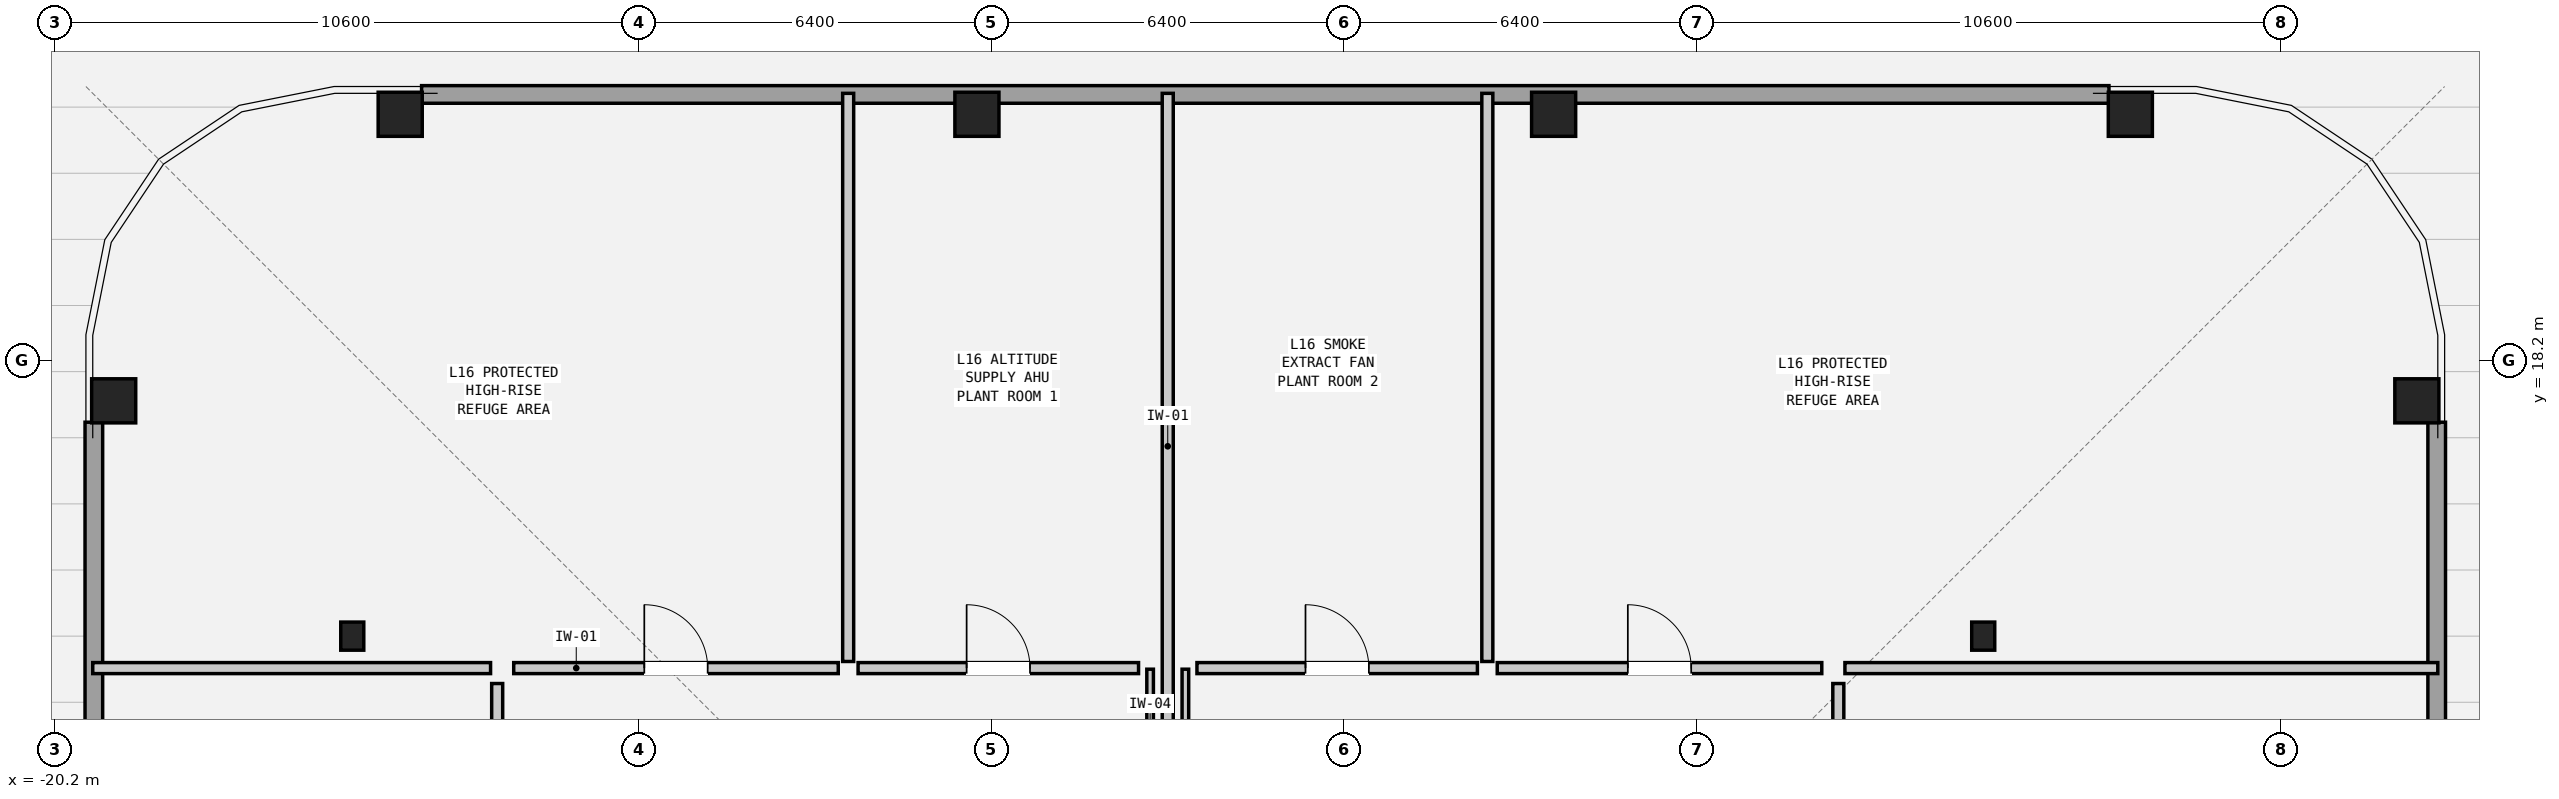
"""IFC4 building model, lengths in metres.
Left out: names, types, materials, properties, quantities, classifications, styles, units other than length and angle.
Written with IfcOpenShell. Run it as: python <this file> out.ifc"""

import sys

from ifc_helpers import new_model, si_unit, direction, frame, frame_2d, origin, origin_2d, place, context, subcontext, project, spatial, rectangle, hollow_rectangle, i_section, extrude, element, fill, save


model = new_model("IFC4")
c1 = context("Model", 3, precision=1e-05, world=origin(), true_north=direction((0.0, 1.0)))
c2 = subcontext(c1, "Body", "Model", "MODEL_VIEW")
j1 = project(units=[si_unit("LENGTHUNIT", "METRE"), si_unit("PLANEANGLEUNIT", "RADIAN")], contexts=[c1])
p1 = place(None, origin())
s1 = spatial("IfcSite", under=j1, at=p1, CompositionType="ELEMENT")
p2 = place(p1, origin())
s2 = spatial("IfcBuilding", under=s1, at=p2, CompositionType="ELEMENT")
p3 = place(p2, frame((0.0, 0.0, 57.9)))
s3 = spatial("IfcBuildingStorey", under=s2, at=p3, CompositionType="ELEMENT", Elevation=57.9)
for number, where, z_axis, x_axis in (
    (1, (22.67, 17.47, 0.0), (0.0, 0.0, 1.0), (0.0, 1.0, 0.0)),
    (2, (17.47, 22.67, 0.0), (0.0, 0.0, 1.0), (1.0, 0.0, 0.0)),
    (3, (7.003, 22.67, 0.0), (0.0, 0.0, 1.0), (1.0, 0.0, 0.0)),
    (4, (-3.463, 22.67, 0.0), (0.0, 0.0, 1.0), (1.0, 0.0, 0.0)),
    (5, (-13.93, 22.67, 0.0), (0.0, 0.0, 1.0), (1.0, 0.0, 0.0)),
    (6, (-19.13, 17.47, 0.0), (0.0, 0.0, 1.0), (0.0, 1.0, 0.0)),
):
    element("IfcColumn", number, at=place(p3, frame(where, z_axis=z_axis, x_axis=x_axis)), inside=s3, PredefinedType="COLUMN", context=c2, shape_type="SweptSolid", body=[
        extrude(hollow_rectangle(XDim=0.8, YDim=0.8, WallThickness=0.05, at=origin_2d()), origin(), (0.0, 0.0, 1.0), 3.6),
    ])
for number, where, z_axis, x_axis in (
    (7, (-14.8, 13.2, 0.0), (0.0, 0.0, 1.0), (1.0, 0.0, 0.0)),
    (8, (14.8, 13.2, 0.0), (0.0, 0.0, 1.0), (1.0, 0.0, 0.0)),
):
    element("IfcColumn", number, at=place(p3, frame(where, z_axis=z_axis, x_axis=x_axis)), inside=s3, PredefinedType="COLUMN", context=c2, shape_type="SweptSolid", body=[
        extrude(i_section(OverallWidth=0.418, OverallDepth=0.51, WebThickness=0.042, FlangeThickness=0.068, at=origin_2d()), origin(), (0.0, 0.0, 1.0), 3.6),
    ])
for number, where, z_axis, x_axis in (
    (9, (23.03, 17.082, 0.0), (0.0, 0.0, 1.0), (0.0, -1.0, 0.0)),
    (10, (-13.542, 23.03, 0.0), (0.0, 0.0, 1.0), (1.0, 0.0, 0.0)),
    (11, (-19.49, -13.542, 0.0), (0.0, 0.0, 1.0), (0.0, 1.0, 0.0)),
):
    element("IfcWall", number, at=place(p3, frame(where, z_axis=z_axis, x_axis=x_axis)), inside=s3, PredefinedType="SOLIDWALL", context=c2, shape_type="SweptSolid", body=[
        extrude(rectangle(XDim=30.624, YDim=0.32, at=frame_2d((15.312, 0.0))), origin(), (0.0, 0.0, 1.0), 2.242),
    ])
p4 = place(p3, frame((0.0, 10.24, 0.0), z_axis=(0.0, 0.0, 1.0), x_axis=(0.0, 1.0, 0.0)))
e12 = element("IfcWall", 12, at=p4, inside=s3, PredefinedType="PARTITIONING", context=c2, shape_type="SweptSolid", body=[
    extrude(rectangle(XDim=12.81, YDim=0.2, at=frame_2d((6.405, 0.0))), origin(), (0.0, 0.0, 1.0), 2.901),
])
for number, where, z_axis, x_axis in (
    (13, (-0.32, 10.24, 0.0), (0.0, 0.0, 1.0), (0.0, 1.0, 0.0)),
    (14, (0.32, 10.24, 0.0), (0.0, 0.0, 1.0), (0.0, 1.0, 0.0)),
):
    element("IfcWall", number, at=place(p3, frame(where, z_axis=z_axis, x_axis=x_axis)), inside=s3, PredefinedType="PARTITIONING", context=c2, shape_type="SweptSolid", body=[
        extrude(rectangle(XDim=2.36, YDim=0.12, at=frame_2d((1.18, 0.0))), origin(), (0.0, 0.0, 1.0), 2.901),
    ])
p5 = place(p3, frame((-11.87, 12.62, 0.0), z_axis=(0.0, 0.0, 1.0), x_axis=(1.0, 0.0, 0.0)))
e15 = element("IfcWall", 15, at=p5, inside=s3, PredefinedType="PARTITIONING", context=c2, shape_type="SweptSolid", body=[
    extrude(rectangle(XDim=5.89, YDim=0.2, at=frame_2d((2.945, 0.0))), origin(), (0.0, 0.0, 1.0), 3.38),
])
p6 = place(p5, frame((2.37, 0.0, 0.0)))
e16 = element("IfcOpeningElement", 16, at=p6, cuts=e15, PredefinedType="OPENING", context=c2, shape_type="SweptSolid", body=[
    extrude(rectangle(XDim=1.15, YDim=2.1, at=frame_2d((0.575, 1.05))), frame((0.0, 0.112, 0.0), z_axis=(0.0, -1.0, 0.0), x_axis=(1.0, 0.0, 0.0)), (0.0, 0.0, 1.0), 0.224),
])
p7 = place(p3, frame((-5.8, 12.74, 0.0), z_axis=(0.0, 0.0, 1.0), x_axis=(0.0, 1.0, 0.0)))
e17 = element("IfcWall", 17, at=p7, inside=s3, PredefinedType="PARTITIONING", context=c2, shape_type="SweptSolid", body=[
    extrude(rectangle(XDim=10.31, YDim=0.2, at=frame_2d((5.155, 0.0))), origin(), (0.0, 0.0, 1.0), 2.901),
])
p8 = place(p3, frame((-5.62, 12.62, 0.0), z_axis=(0.0, 0.0, 1.0), x_axis=(1.0, 0.0, 0.0)))
e18 = element("IfcWall", 18, at=p8, inside=s3, PredefinedType="PARTITIONING", context=c2, shape_type="SweptSolid", body=[
    extrude(rectangle(XDim=5.09, YDim=0.2, at=frame_2d((2.545, 0.0))), origin(), (0.0, 0.0, 1.0), 3.38),
])
p9 = place(p8, frame((1.97, 0.0, 0.0)))
e19 = element("IfcOpeningElement", 19, at=p9, cuts=e18, PredefinedType="OPENING", context=c2, shape_type="SweptSolid", body=[
    extrude(rectangle(XDim=1.15, YDim=2.1, at=frame_2d((0.575, 1.05))), frame((0.0, 0.112, 0.0), z_axis=(0.0, -1.0, 0.0), x_axis=(1.0, 0.0, 0.0)), (0.0, 0.0, 1.0), 0.224),
])
p10 = place(p3, frame((0.53, 12.62, 0.0), z_axis=(0.0, 0.0, 1.0), x_axis=(1.0, 0.0, 0.0)))
e20 = element("IfcWall", 20, at=p10, inside=s3, PredefinedType="PARTITIONING", context=c2, shape_type="SweptSolid", body=[
    extrude(rectangle(XDim=5.09, YDim=0.2, at=frame_2d((2.545, 0.0))), origin(), (0.0, 0.0, 1.0), 3.38),
])
p11 = place(p10, frame((1.97, 0.0, 0.0)))
e21 = element("IfcOpeningElement", 21, at=p11, cuts=e20, PredefinedType="OPENING", context=c2, shape_type="SweptSolid", body=[
    extrude(rectangle(XDim=1.15, YDim=2.1, at=frame_2d((0.575, 1.05))), frame((0.0, 0.112, 0.0), z_axis=(0.0, -1.0, 0.0), x_axis=(1.0, 0.0, 0.0)), (0.0, 0.0, 1.0), 0.224),
])
p12 = place(p3, frame((5.8, 12.74, 0.0), z_axis=(0.0, 0.0, 1.0), x_axis=(0.0, 1.0, 0.0)))
e22 = element("IfcWall", 22, at=p12, inside=s3, PredefinedType="PARTITIONING", context=c2, shape_type="SweptSolid", body=[
    extrude(rectangle(XDim=10.31, YDim=0.2, at=frame_2d((5.155, 0.0))), origin(), (0.0, 0.0, 1.0), 2.901),
])
p13 = place(p3, frame((5.98, 12.62, 0.0), z_axis=(0.0, 0.0, 1.0), x_axis=(1.0, 0.0, 0.0)))
e23 = element("IfcWall", 23, at=p13, inside=s3, PredefinedType="PARTITIONING", context=c2, shape_type="SweptSolid", body=[
    extrude(rectangle(XDim=5.89, YDim=0.2, at=frame_2d((2.945, 0.0))), origin(), (0.0, 0.0, 1.0), 3.38),
])
p14 = place(p13, frame((2.37, 0.0, 0.0)))
e24 = element("IfcOpeningElement", 24, at=p14, cuts=e23, PredefinedType="OPENING", context=c2, shape_type="SweptSolid", body=[
    extrude(rectangle(XDim=1.15, YDim=2.1, at=frame_2d((0.575, 1.05))), frame((0.0, 0.112, 0.0), z_axis=(0.0, -1.0, 0.0), x_axis=(1.0, 0.0, 0.0)), (0.0, 0.0, 1.0), 0.224),
])
p15 = place(p3, frame((-19.51, 12.62, 0.0), z_axis=(0.0, 0.0, 1.0), x_axis=(1.0, 0.0, 0.0)))
e25 = element("IfcWall", 25, at=p15, inside=s3, PredefinedType="PARTITIONING", context=c2, shape_type="SweptSolid", body=[
    extrude(rectangle(XDim=7.22, YDim=0.2, at=frame_2d((3.61, 0.0))), origin(), (0.0, 0.0, 1.0), 3.38),
])
p16 = place(p3, frame((12.29, 12.62, 0.0), z_axis=(0.0, 0.0, 1.0), x_axis=(1.0, 0.0, 0.0)))
e26 = element("IfcWall", 26, at=p16, inside=s3, PredefinedType="PARTITIONING", context=c2, shape_type="SweptSolid", body=[
    extrude(rectangle(XDim=10.76, YDim=0.2, at=frame_2d((5.38, 0.0))), origin(), (0.0, 0.0, 1.0), 3.38),
])
p17 = place(p3, frame((-12.17, 0.81, 0.0), z_axis=(0.0, 0.0, 1.0), x_axis=(0.0, 1.0, 0.0)))
e27 = element("IfcWall", 27, at=p17, inside=s3, PredefinedType="PARTITIONING", context=c2, shape_type="SweptSolid", body=[
    extrude(rectangle(XDim=11.53, YDim=0.2, at=frame_2d((5.765, 0.0))), origin(), (0.0, 0.0, 1.0), 3.38),
])
p18 = place(p17, frame((5.19, 0.0, 0.0)))
e28 = element("IfcOpeningElement", 28, at=p18, cuts=e27, PredefinedType="OPENING", context=c2, shape_type="SweptSolid", body=[
    extrude(rectangle(XDim=1.15, YDim=2.1, at=frame_2d((0.575, 1.05))), frame((0.0, 0.112, 0.0), z_axis=(0.0, -1.0, 0.0), x_axis=(1.0, 0.0, 0.0)), (0.0, 0.0, 1.0), 0.224),
])
p19 = place(p3, frame((12.17, 0.81, 0.0), z_axis=(0.0, 0.0, 1.0), x_axis=(0.0, 1.0, 0.0)))
e29 = element("IfcWall", 29, at=p19, inside=s3, PredefinedType="PARTITIONING", context=c2, shape_type="SweptSolid", body=[
    extrude(rectangle(XDim=11.53, YDim=0.2, at=frame_2d((5.765, 0.0))), origin(), (0.0, 0.0, 1.0), 3.38),
])
p20 = place(p19, frame((6.574, 0.0, 0.0)))
e30 = element("IfcOpeningElement", 30, at=p20, cuts=e29, PredefinedType="OPENING", context=c2, shape_type="SweptSolid", body=[
    extrude(rectangle(XDim=1.15, YDim=2.1, at=frame_2d((0.575, 1.05))), frame((0.0, 0.112, 0.0), z_axis=(0.0, -1.0, 0.0), x_axis=(1.0, 0.0, 0.0)), (0.0, 0.0, 1.0), 0.224),
])
p21 = place(p6, origin())
e31 = element("IfcDoor", 31, at=p21, inside=s3, OperationType="SINGLE_SWING_LEFT", PredefinedType="DOOR", context=c2, shape_type="SweptSolid", body=[
    extrude(rectangle(XDim=1.15, YDim=2.1, at=frame_2d((0.575, 1.05))), frame((0.0, 0.025, 0.0), z_axis=(0.0, -1.0, 0.0), x_axis=(1.0, 0.0, 0.0)), (0.0, 0.0, 1.0), 0.05),
])
fill(e16, e31)
p22 = place(p9, origin())
e32 = element("IfcDoor", 32, at=p22, inside=s3, OperationType="SINGLE_SWING_LEFT", PredefinedType="DOOR", context=c2, shape_type="SweptSolid", body=[
    extrude(rectangle(XDim=1.15, YDim=2.1, at=frame_2d((0.575, 1.05))), frame((0.0, 0.025, 0.0), z_axis=(0.0, -1.0, 0.0), x_axis=(1.0, 0.0, 0.0)), (0.0, 0.0, 1.0), 0.05),
])
fill(e19, e32)
p23 = place(p11, origin())
e33 = element("IfcDoor", 33, at=p23, inside=s3, OperationType="SINGLE_SWING_LEFT", PredefinedType="DOOR", context=c2, shape_type="SweptSolid", body=[
    extrude(rectangle(XDim=1.15, YDim=2.1, at=frame_2d((0.575, 1.05))), frame((0.0, 0.025, 0.0), z_axis=(0.0, -1.0, 0.0), x_axis=(1.0, 0.0, 0.0)), (0.0, 0.0, 1.0), 0.05),
])
fill(e21, e33)
p24 = place(p14, origin())
e34 = element("IfcDoor", 34, at=p24, inside=s3, OperationType="SINGLE_SWING_LEFT", PredefinedType="DOOR", context=c2, shape_type="SweptSolid", body=[
    extrude(rectangle(XDim=1.15, YDim=2.1, at=frame_2d((0.575, 1.05))), frame((0.0, 0.025, 0.0), z_axis=(0.0, -1.0, 0.0), x_axis=(1.0, 0.0, 0.0)), (0.0, 0.0, 1.0), 0.05),
])
fill(e24, e34)
save(model, sys.argv[1])
